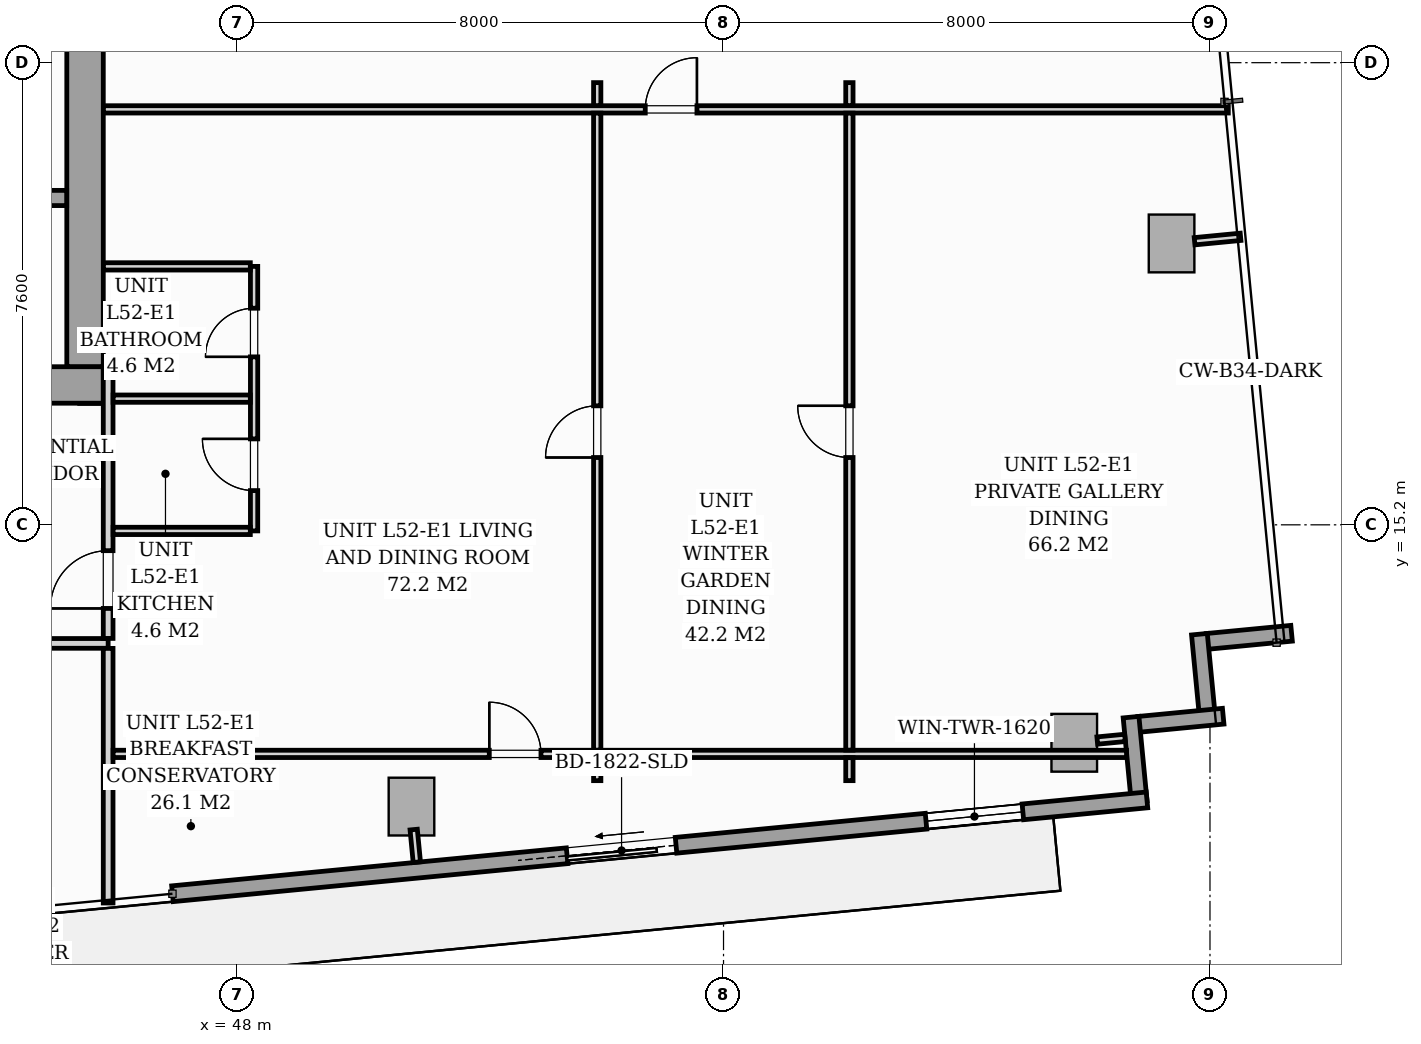
"""IFC4 building model, lengths in metres.
Left out: names, types, materials, properties, quantities, classifications, styles, units other than length and angle.
Written with IfcOpenShell. Run it as: python <this file> out.ifc"""

import sys

from ifc_helpers import new_model, si_unit, direction, frame, frame_2d, origin, origin_2d, place, context, subcontext, project, spatial, rectangle, i_section, extrude, source, transform, mapped, element, fill, save


model = new_model("IFC4")
c1 = context("Model", 3, precision=1e-05, world=origin(), true_north=direction((0.0, 1.0)))
c2 = subcontext(c1, "Body", "Model", "MODEL_VIEW")
j1 = project(units=[si_unit("LENGTHUNIT", "METRE"), si_unit("PLANEANGLEUNIT", "RADIAN")], contexts=[c1])
p1 = place(None, origin())
s1 = spatial("IfcSite", under=j1, at=p1, CompositionType="ELEMENT")
p2 = place(p1, origin())
s2 = spatial("IfcBuilding", under=s1, at=p2, CompositionType="ELEMENT")
p3 = place(p2, frame((0.0, 0.0, 182.6)))
s3 = spatial("IfcBuildingStorey", under=s2, at=p3, CompositionType="ELEMENT", Elevation=182.6)
m1 = source(origin(), c2, "Body", "SweptSolid", [
    extrude(i_section(OverallWidth=0.416, OverallDepth=0.446, WebThickness=0.039, FlangeThickness=0.063, FilletRadius=0.018, at=origin_2d()), origin(), (0.0, 0.0, 1.0), 3.196),
])
p4 = place(p3, frame((45.6, 17.4, 0.002), z_axis=(0.0, 0.0, 1.0), x_axis=(1.0, 0.0, 0.0)))
e1 = element("IfcColumn", 1, at=p4, inside=s3, PredefinedType="PILASTER", context=c2, shape_type="MappedRepresentation", body=[
    mapped(m1, transform((0.0, 0.0, 0.0), scale=1.0)),
])
m2 = source(origin(), c2, "Body", "SweptSolid", [
    extrude(rectangle(XDim=0.75, YDim=0.95, at=origin_2d()), origin(), (0.0, 0.0, 1.0), 3.196),
])
for number, where, z_axis, x_axis in (
    (2, (50.868, 10.566, 0.002), (0.0, 0.0, 1.0), (0.995, 0.096, 0.0)),
    (3, (61.768, 11.616, 0.002), (0.0, 0.0, 1.0), (0.995, 0.096, 0.0)),
    (4, (63.368, 19.827, 0.002), (0.0, 0.0, 1.0), (0.995, 0.096, 0.0)),
):
    element("IfcColumn", number, at=place(p3, frame(where, z_axis=z_axis, x_axis=x_axis)), inside=s3, PredefinedType="COLUMN", context=c2, shape_type="MappedRepresentation", body=[
        mapped(m2, transform((0.0, 0.0, 0.0), scale=1.0)),
    ])
p5 = place(p3, frame((65.342, 13.417, 0.0), z_axis=(0.0, 0.0, 1.0), x_axis=(-0.99540774648, -0.095725744959, 0.0)))
e5 = element("IfcWall", 5, at=p5, inside=s3, PredefinedType="STANDARD", context=c2, shape_type="SweptSolid", body=[
    extrude(rectangle(XDim=1.395, YDim=0.26, at=frame_2d((0.698, 0.0))), origin(), (0.0, 0.0, 1.0), 2.94),
])
p6 = place(p3, frame((63.826, 13.401, 0.0), z_axis=(0.0, 0.0, 1.0), x_axis=(0.095915846097, -0.995389446633, 0.0)))
e6 = element("IfcWall", 6, at=p6, inside=s3, PredefinedType="STANDARD", context=c2, shape_type="SweptSolid", body=[
    extrude(rectangle(XDim=1.395, YDim=0.26, at=frame_2d((0.697, 0.0))), origin(), (0.0, 0.0, 1.0), 2.94),
])
for number, where, z_axis, x_axis in (
    (7, (64.217, 12.053, 0.0), (0.0, 0.0, 1.0), (-0.995, -0.096, 0.0)),
    (8, (62.702, 12.037, 0.0), (0.0, 0.0, 1.0), (0.096, -0.995, 0.0)),
):
    element("IfcWall", number, at=place(p3, frame(where, z_axis=z_axis, x_axis=x_axis)), inside=s3, PredefinedType="STANDARD", context=c2, shape_type="SweptSolid", body=[
        extrude(rectangle(XDim=1.395, YDim=0.26, at=frame_2d((0.698, 0.0))), origin(), (0.0, 0.0, 1.0), 2.94),
    ])
p7 = place(p3, frame((62.963, 10.676, 0.0), z_axis=(0.0, 0.0, 1.0), x_axis=(-0.995395627913, -0.095851676732, 0.0)))
e9 = element("IfcWall", 9, at=p7, inside=s3, PredefinedType="STANDARD", context=c2, shape_type="SweptSolid", body=[
    extrude(rectangle(XDim=16.1, YDim=0.26, at=frame_2d((8.05, 0.0))), origin(), (0.0, 0.0, 1.0), 2.94),
])
p8 = place(p7, frame((7.78, 0.0, 0.0)))
e10 = element("IfcOpeningElement", 10, at=p8, cuts=e9, PredefinedType="OPENING", context=c2, shape_type="SweptSolid", body=[
    extrude(rectangle(XDim=1.8, YDim=2.06, at=frame_2d((0.9, 1.03))), frame((0.0, 0.14, 0.0), z_axis=(0.0, -1.0, 0.0), x_axis=(1.0, 0.0, 0.0)), (0.0, 0.0, 1.0), 0.28),
])
p9 = place(p7, frame((2.05, 0.0, 0.65)))
e11 = element("IfcOpeningElement", 11, at=p9, cuts=e9, PredefinedType="OPENING", context=c2, shape_type="SweptSolid", body=[
    extrude(rectangle(XDim=1.6, YDim=1.5, at=frame_2d((0.8, 0.75))), frame((0.0, 0.14, 0.0), z_axis=(0.0, -1.0, 0.0), x_axis=(1.0, 0.0, 0.0)), (0.0, 0.0, 1.0), 0.28),
])
p10 = place(p3, frame((26.2, 17.5, 0.0), z_axis=(0.0, 0.0, 1.0), x_axis=(1.0, 0.0, 0.0)))
e12 = element("IfcWall", 12, at=p10, inside=s3, PredefinedType="SHEAR", context=c2, shape_type="SweptSolid", body=[
    extrude(rectangle(XDim=19.6, YDim=0.6, at=frame_2d((9.8, 0.0))), origin(), (0.0, 0.0, 1.0), 3.2),
])
p11 = place(p10, frame((0.95, 0.0, 0.0)))
e13 = element("IfcOpeningElement", 13, at=p11, cuts=e12, PredefinedType="OPENING", context=c2, shape_type="SweptSolid", body=[
    extrude(rectangle(XDim=0.95, YDim=2.06, at=frame_2d((0.475, 1.03))), frame((0.0, 0.31, 0.0), z_axis=(0.0, -1.0, 0.0), x_axis=(1.0, 0.0, 0.0)), (0.0, 0.0, 1.0), 0.62),
])
p12 = place(p10, frame((9.38, 0.0, 0.0)))
e14 = element("IfcOpeningElement", 14, at=p12, cuts=e12, PredefinedType="OPENING", context=c2, shape_type="SweptSolid", body=[
    extrude(rectangle(XDim=0.85, YDim=2.0, at=frame_2d((0.425, 1.0))), frame((0.0, 0.31, 0.0), z_axis=(0.0, -1.0, 0.0), x_axis=(1.0, 0.0, 0.0)), (0.0, 0.0, 1.0), 0.62),
])
p13 = place(p10, frame((17.55, 0.0, 0.0)))
e15 = element("IfcOpeningElement", 15, at=p13, cuts=e12, PredefinedType="OPENING", context=c2, shape_type="SweptSolid", body=[
    extrude(rectangle(XDim=0.95, YDim=2.06, at=frame_2d((0.475, 1.03))), frame((0.0, 0.31, 0.0), z_axis=(0.0, -1.0, 0.0), x_axis=(1.0, 0.0, 0.0)), (0.0, 0.0, 1.0), 0.62),
])
p14 = place(p3, frame((45.5, 17.802, 0.0), z_axis=(0.0, 0.0, 1.0), x_axis=(0.0, 1.0, 0.0)))
e16 = element("IfcWall", 16, at=p14, inside=s3, PredefinedType="SHEAR", context=c2, shape_type="SweptSolid", body=[
    extrude(rectangle(XDim=5.796, YDim=0.6, at=frame_2d((2.898, 0.0))), origin(), (0.0, 0.0, 1.0), 3.2),
])
p15 = place(p3, frame((37.05, 20.575, 0.0), z_axis=(0.0, 0.0, 1.0), x_axis=(1.0, 0.0, 0.0)))
e17 = element("IfcWall", 17, at=p15, inside=s3, PredefinedType="SOLIDWALL", context=c2, shape_type="SweptSolid", body=[
    extrude(rectangle(XDim=8.148, YDim=0.25, at=frame_2d((4.074, 0.0))), origin(), (0.0, 0.0, 1.0), 3.2),
])
p16 = place(p15, frame((6.6, 0.0, 0.0)))
e18 = element("IfcOpeningElement", 18, at=p16, cuts=e17, PredefinedType="OPENING", context=c2, shape_type="SweptSolid", body=[
    extrude(rectangle(XDim=0.95, YDim=2.06, at=frame_2d((0.475, 1.03))), frame((0.0, 0.135, 0.0), z_axis=(0.0, -1.0, 0.0), x_axis=(1.0, 0.0, 0.0)), (0.0, 0.0, 1.0), 0.27),
])
p17 = place(p3, frame((22.6, 13.25, 0.0), z_axis=(0.0, 0.0, 1.0), x_axis=(1.0, 0.0, 0.0)))
e19 = element("IfcWall", 19, at=p17, inside=s3, PredefinedType="PARTITIONING", context=c2, shape_type="SweptSolid", body=[
    extrude(rectangle(XDim=23.28, YDim=0.16, at=frame_2d((11.64, 0.0))), origin(), (0.0, 0.0, 1.0), 2.94),
])
p18 = place(p17, frame((3.335, 0.0, 0.0)))
e20 = element("IfcOpeningElement", 20, at=p18, cuts=e19, PredefinedType="OPENING", context=c2, shape_type="SweptSolid", body=[
    extrude(rectangle(XDim=0.95, YDim=2.06, at=frame_2d((0.475, 1.03))), frame((0.0, 0.09, 0.0), z_axis=(0.0, -1.0, 0.0), x_axis=(1.0, 0.0, 0.0)), (0.0, 0.0, 1.0), 0.18),
])
p19 = place(p17, frame((15.096, 0.0, 0.0)))
e21 = element("IfcOpeningElement", 21, at=p19, cuts=e19, PredefinedType="OPENING", context=c2, shape_type="SweptSolid", body=[
    extrude(rectangle(XDim=0.95, YDim=2.06, at=frame_2d((0.475, 1.03))), frame((0.0, 0.09, 0.0), z_axis=(0.0, -1.0, 0.0), x_axis=(1.0, 0.0, 0.0)), (0.0, 0.0, 1.0), 0.18),
])
p20 = place(p3, frame((45.88, 8.981, 0.0), z_axis=(0.0, 0.0, 1.0), x_axis=(0.0, 1.0, 0.0)))
e22 = element("IfcWall", 22, at=p20, inside=s3, PredefinedType="PARTITIONING", context=c2, shape_type="SweptSolid", body=[
    extrude(rectangle(XDim=4.187, YDim=0.16, at=frame_2d((2.094, 0.0))), origin(), (0.0, 0.0, 1.0), 2.94),
])
p21 = place(p3, frame((45.88, 13.332, 0.0), z_axis=(0.0, 0.0, 1.0), x_axis=(0.0, 1.0, 0.0)))
e23 = element("IfcWall", 23, at=p21, inside=s3, PredefinedType="PARTITIONING", context=c2, shape_type="SweptSolid", body=[
    extrude(rectangle(XDim=4.47, YDim=0.16, at=frame_2d((2.235, 0.0))), origin(), (0.0, 0.0, 1.0), 2.94),
])
p22 = place(p21, frame((0.493, 0.0, 0.0)))
e24 = element("IfcOpeningElement", 24, at=p22, cuts=e23, PredefinedType="OPENING", context=c2, shape_type="SweptSolid", body=[
    extrude(rectangle(XDim=0.95, YDim=2.06, at=frame_2d((0.475, 1.03))), frame((0.0, 0.09, 0.0), z_axis=(0.0, -1.0, 0.0), x_axis=(1.0, 0.0, 0.0)), (0.0, 0.0, 1.0), 0.18),
])
p23 = place(p3, frame((48.28, 15.1, 0.0), z_axis=(0.0, 0.0, 1.0), x_axis=(0.0, 1.0, 0.0)))
e25 = element("IfcWall", 25, at=p23, inside=s3, PredefinedType="PARTITIONING", context=c2, shape_type="SweptSolid", body=[
    extrude(rectangle(XDim=4.35, YDim=0.12, at=frame_2d((2.175, 0.0))), origin(), (0.0, 0.0, 1.0), 2.94),
])
p24 = place(p23, frame((0.663, 0.0, 0.0)))
e26 = element("IfcOpeningElement", 26, at=p24, cuts=e25, PredefinedType="OPENING", context=c2, shape_type="SweptSolid", body=[
    extrude(rectangle(XDim=0.85, YDim=2.05, at=frame_2d((0.425, 1.025))), frame((0.0, 0.07, 0.0), z_axis=(0.0, -1.0, 0.0), x_axis=(1.0, 0.0, 0.0)), (0.0, 0.0, 1.0), 0.14),
])
p25 = place(p23, frame((2.862, 0.0, 0.0)))
e27 = element("IfcOpeningElement", 27, at=p25, cuts=e25, PredefinedType="OPENING", context=c2, shape_type="SweptSolid", body=[
    extrude(rectangle(XDim=0.8, YDim=2.02, at=frame_2d((0.4, 1.01))), frame((0.0, 0.07, 0.0), z_axis=(0.0, -1.0, 0.0), x_axis=(1.0, 0.0, 0.0)), (0.0, 0.0, 1.0), 0.14),
])
for number, where, z_axis, x_axis in (
    (28, (45.962, 17.275, 0.0), (0.0, 0.0, 1.0), (1.0, 0.0, 0.0)),
    (29, (45.962, 15.1, 0.0), (0.0, 0.0, 1.0), (1.0, 0.0, 0.0)),
):
    element("IfcWall", number, at=place(p3, frame(where, z_axis=z_axis, x_axis=x_axis)), inside=s3, PredefinedType="PARTITIONING", context=c2, shape_type="SweptSolid", body=[
        extrude(rectangle(XDim=2.256, YDim=0.12, at=frame_2d((1.128, 0.0))), origin(), (0.0, 0.0, 1.0), 2.94),
    ])
p26 = place(p3, frame((45.802, 19.45, 0.0), z_axis=(0.0, 0.0, 1.0), x_axis=(1.0, 0.0, 0.0)))
e30 = element("IfcWall", 30, at=p26, inside=s3, PredefinedType="PARTITIONING", context=c2, shape_type="SweptSolid", body=[
    extrude(rectangle(XDim=2.416, YDim=0.12, at=frame_2d((1.208, 0.0))), origin(), (0.0, 0.0, 1.0), 2.94),
])
p27 = place(p3, frame((45.802, 22.032, 0.0), z_axis=(0.0, 0.0, 1.0), x_axis=(1.0, 0.0, 0.0)))
e31 = element("IfcWall", 31, at=p27, inside=s3, PredefinedType="PARTITIONING", context=c2, shape_type="SweptSolid", body=[
    extrude(rectangle(XDim=18.499, YDim=0.12, at=frame_2d((9.25, 0.0))), origin(), (0.0, 0.0, 1.0), 2.94),
])
p28 = place(p27, frame((8.911, 0.0, 0.0)))
e32 = element("IfcOpeningElement", 32, at=p28, cuts=e31, PredefinedType="OPENING", context=c2, shape_type="SweptSolid", body=[
    extrude(rectangle(XDim=0.85, YDim=2.05, at=frame_2d((0.425, 1.025))), frame((0.0, 0.07, 0.0), z_axis=(0.0, -1.0, 0.0), x_axis=(1.0, 0.0, 0.0)), (0.0, 0.0, 1.0), 0.14),
])
p29 = place(p3, frame((45.962, 11.433, 0.0), z_axis=(0.0, 0.0, 1.0), x_axis=(1.0, 0.0, 0.0)))
e33 = element("IfcWall", 33, at=p29, inside=s3, PredefinedType="PARTITIONING", context=c2, shape_type="SweptSolid", body=[
    extrude(rectangle(XDim=16.666, YDim=0.12, at=frame_2d((8.333, 0.0))), origin(), (0.0, 0.0, 1.0), 2.382),
])
p30 = place(p29, frame((6.186, 0.0, 0.0)))
e34 = element("IfcOpeningElement", 34, at=p30, cuts=e33, PredefinedType="OPENING", context=c2, shape_type="SweptSolid", body=[
    extrude(rectangle(XDim=0.85, YDim=2.05, at=frame_2d((0.425, 1.025))), frame((0.0, 0.07, 0.0), z_axis=(0.0, -1.0, 0.0), x_axis=(1.0, 0.0, 0.0)), (0.0, 0.0, 1.0), 0.14),
])
p31 = place(p3, frame((58.07, 10.993, 0.0), z_axis=(0.0, 0.0, 1.0), x_axis=(0.0, 1.0, 0.0)))
e35 = element("IfcWall", 35, at=p31, inside=s3, PredefinedType="PARTITIONING", context=c2, shape_type="SweptSolid", body=[
    extrude(rectangle(XDim=0.378, YDim=0.12, at=frame_2d((0.189, 0.0))), origin(), (0.0, 0.0, 1.0), 2.94),
])
p32 = place(p3, frame((58.07, 11.495, 0.0), z_axis=(0.0, 0.0, 1.0), x_axis=(0.0, 1.0, 0.0)))
e36 = element("IfcWall", 36, at=p32, inside=s3, PredefinedType="PARTITIONING", context=c2, shape_type="SweptSolid", body=[
    extrude(rectangle(XDim=10.475, YDim=0.12, at=frame_2d((5.237, 0.0))), origin(), (0.0, 0.0, 1.0), 2.94),
])
p33 = place(p32, frame((4.812, 0.0, 0.0)))
e37 = element("IfcOpeningElement", 37, at=p33, cuts=e36, PredefinedType="OPENING", context=c2, shape_type="SweptSolid", body=[
    extrude(rectangle(XDim=0.85, YDim=2.05, at=frame_2d((0.425, 1.025))), frame((0.0, 0.07, 0.0), z_axis=(0.0, -1.0, 0.0), x_axis=(1.0, 0.0, 0.0)), (0.0, 0.0, 1.0), 0.14),
])
p34 = place(p3, frame((58.07, 22.094, 0.0), z_axis=(0.0, 0.0, 1.0), x_axis=(0.0, 1.0, 0.0)))
e38 = element("IfcWall", 38, at=p34, inside=s3, PredefinedType="PARTITIONING", context=c2, shape_type="SweptSolid", body=[
    extrude(rectangle(XDim=0.378, YDim=0.12, at=frame_2d((0.189, 0.0))), origin(), (0.0, 0.0, 1.0), 2.94),
])
p35 = place(p3, frame((53.923, 10.993, 0.0), z_axis=(0.0, 0.0, 1.0), x_axis=(0.0, 1.0, 0.0)))
e39 = element("IfcWall", 39, at=p35, inside=s3, PredefinedType="PARTITIONING", context=c2, shape_type="SweptSolid", body=[
    extrude(rectangle(XDim=0.378, YDim=0.12, at=frame_2d((0.189, 0.0))), origin(), (0.0, 0.0, 1.0), 2.94),
])
p36 = place(p3, frame((53.923, 11.495, 0.0), z_axis=(0.0, 0.0, 1.0), x_axis=(0.0, 1.0, 0.0)))
e40 = element("IfcWall", 40, at=p36, inside=s3, PredefinedType="PARTITIONING", context=c2, shape_type="SweptSolid", body=[
    extrude(rectangle(XDim=10.475, YDim=0.12, at=frame_2d((5.237, 0.0))), origin(), (0.0, 0.0, 1.0), 2.94),
])
p37 = place(p36, frame((4.812, 0.0, 0.0)))
e41 = element("IfcOpeningElement", 41, at=p37, cuts=e40, PredefinedType="OPENING", context=c2, shape_type="SweptSolid", body=[
    extrude(rectangle(XDim=0.85, YDim=2.05, at=frame_2d((0.425, 1.025))), frame((0.0, 0.07, 0.0), z_axis=(0.0, -1.0, 0.0), x_axis=(1.0, 0.0, 0.0)), (0.0, 0.0, 1.0), 0.14),
])
p38 = place(p3, frame((53.923, 22.094, 0.0), z_axis=(0.0, 0.0, 1.0), x_axis=(0.0, 1.0, 0.0)))
e42 = element("IfcWall", 42, at=p38, inside=s3, PredefinedType="PARTITIONING", context=c2, shape_type="SweptSolid", body=[
    extrude(rectangle(XDim=0.378, YDim=0.12, at=frame_2d((0.189, 0.0))), origin(), (0.0, 0.0, 1.0), 2.94),
])
p39 = place(p3, frame((50.905, 10.188, 0.0), z_axis=(0.0, 0.0, 1.0), x_axis=(0.095772948675, -0.995403205893, 0.0)))
e43 = element("IfcWall", 43, at=p39, inside=s3, PredefinedType="PARTITIONING", context=c2, shape_type="SweptSolid", body=[
    extrude(rectangle(XDim=0.538, YDim=0.12, at=frame_2d((0.269, 0.0))), origin(), (0.0, 0.0, 1.0), 2.94),
])
p40 = place(p3, frame((62.146, 11.652, 0.0), z_axis=(0.0, 0.0, 1.0), x_axis=(0.995384576284, 0.09596637586, 0.0)))
e44 = element("IfcWall", 44, at=p40, inside=s3, PredefinedType="PARTITIONING", context=c2, shape_type="SweptSolid", body=[
    extrude(rectangle(XDim=0.458, YDim=0.12, at=frame_2d((0.229, 0.0))), origin(), (0.0, 0.0, 1.0), 2.94),
])
p41 = place(p3, frame((63.747, 19.864, 0.0), z_axis=(0.0, 0.0, 1.0), x_axis=(0.995405496295, 0.095749140702, 0.0)))
e45 = element("IfcWall", 45, at=p41, inside=s3, PredefinedType="PARTITIONING", context=c2, shape_type="SweptSolid", body=[
    extrude(rectangle(XDim=0.76, YDim=0.12, at=frame_2d((0.38, 0.0))), origin(), (0.0, 0.0, 1.0), 2.94),
])
m3 = source(origin(), c2, "Body", "SweptSolid", [
    extrude(rectangle(XDim=1.8, YDim=2.06, at=frame_2d((0.9, 1.03))), frame((0.0, 0.025, 0.0), z_axis=(0.0, -1.0, 0.0), x_axis=(1.0, 0.0, 0.0)), (0.0, 0.0, 1.0), 0.05),
])
p42 = place(p8, origin())
e46 = element("IfcDoor", 46, at=p42, inside=s3, OperationType="SLIDING_TO_RIGHT", PredefinedType="DOOR", context=c2, shape_type="MappedRepresentation", body=[
    mapped(m3, transform((0.0, 0.0, 0.0), scale=1.0)),
])
fill(e10, e46)
m4 = source(origin(), c2, "Body", "SweptSolid", [
    extrude(rectangle(XDim=1.6, YDim=1.5, at=frame_2d((0.8, 0.75))), frame((0.0, 0.03, 0.0), z_axis=(0.0, -1.0, 0.0), x_axis=(1.0, 0.0, 0.0)), (0.0, 0.0, 1.0), 0.06),
])
p43 = place(p9, origin())
e47 = element("IfcWindow", 47, at=p43, inside=s3, PartitioningType="SINGLE_PANEL", PredefinedType="WINDOW", context=c2, shape_type="MappedRepresentation", body=[
    mapped(m4, transform((0.0, 0.0, 0.0), scale=1.0)),
])
fill(e11, e47)
m5 = source(origin(), c2, "Body", "SweptSolid", [
    extrude(rectangle(XDim=0.95, YDim=2.06, at=frame_2d((0.475, 1.03))), frame((0.0, 0.025, 0.0), z_axis=(0.0, -1.0, 0.0), x_axis=(1.0, 0.0, 0.0)), (0.0, 0.0, 1.0), 0.05),
])
p44 = place(p22, origin())
e48 = element("IfcDoor", 48, at=p44, inside=s3, OperationType="SINGLE_SWING_LEFT", PredefinedType="DOOR", context=c2, shape_type="MappedRepresentation", body=[
    mapped(m5, transform((0.0, 0.0, 0.0), scale=1.0)),
])
fill(e24, e48)
m6 = source(origin(), c2, "Body", "SweptSolid", [
    extrude(rectangle(XDim=0.85, YDim=2.05, at=frame_2d((0.425, 1.025))), frame((0.0, 0.025, 0.0), z_axis=(0.0, -1.0, 0.0), x_axis=(1.0, 0.0, 0.0)), (0.0, 0.0, 1.0), 0.05),
])
p45 = place(p24, origin())
e49 = element("IfcDoor", 49, at=p45, inside=s3, OperationType="SINGLE_SWING_RIGHT", PredefinedType="DOOR", context=c2, shape_type="MappedRepresentation", body=[
    mapped(m6, transform((0.0, 0.0, 0.0), scale=1.0)),
])
fill(e26, e49)
m7 = source(origin(), c2, "Body", "SweptSolid", [
    extrude(rectangle(XDim=0.8, YDim=2.02, at=frame_2d((0.4, 1.01))), frame((0.0, 0.025, 0.0), z_axis=(0.0, -1.0, 0.0), x_axis=(1.0, 0.0, 0.0)), (0.0, 0.0, 1.0), 0.05),
])
p46 = place(p25, origin())
e50 = element("IfcDoor", 50, at=p46, inside=s3, OperationType="SINGLE_SWING_LEFT", PredefinedType="DOOR", context=c2, shape_type="MappedRepresentation", body=[
    mapped(m7, transform((0.0, 0.0, 0.0), scale=1.0)),
])
fill(e27, e50)
p47 = place(p28, origin())
e51 = element("IfcDoor", 51, at=p47, inside=s3, OperationType="SINGLE_SWING_RIGHT", PredefinedType="DOOR", context=c2, shape_type="MappedRepresentation", body=[
    mapped(m6, transform((0.0, 0.0, 0.0), scale=1.0)),
])
fill(e32, e51)
p48 = place(p30, origin())
e52 = element("IfcDoor", 52, at=p48, inside=s3, OperationType="SINGLE_SWING_LEFT", PredefinedType="DOOR", context=c2, shape_type="MappedRepresentation", body=[
    mapped(m6, transform((0.0, 0.0, 0.0), scale=1.0)),
])
fill(e34, e52)
p49 = place(p33, origin())
e53 = element("IfcDoor", 53, at=p49, inside=s3, OperationType="SINGLE_SWING_RIGHT", PredefinedType="DOOR", context=c2, shape_type="MappedRepresentation", body=[
    mapped(m6, transform((0.0, 0.0, 0.0), scale=1.0)),
])
fill(e37, e53)
p50 = place(p37, origin())
e54 = element("IfcDoor", 54, at=p50, inside=s3, OperationType="SINGLE_SWING_LEFT", PredefinedType="DOOR", context=c2, shape_type="MappedRepresentation", body=[
    mapped(m6, transform((0.0, 0.0, 0.0), scale=1.0)),
])
fill(e41, e54)
save(model, sys.argv[1])
